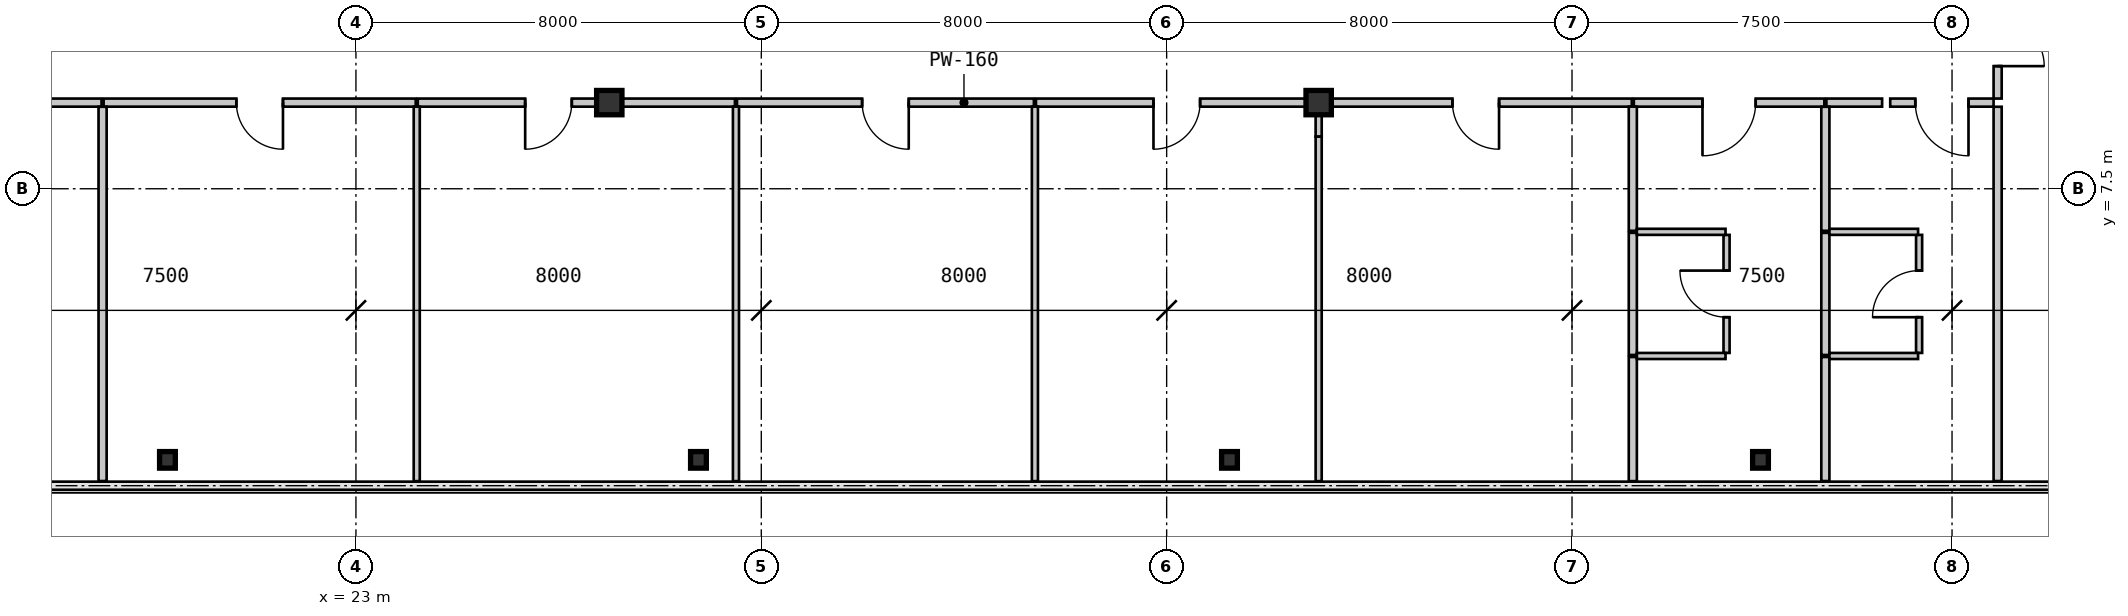
"""IFC4 building model, lengths in metres.
Left out: names, types, materials, properties, quantities, classifications, styles, units other than length and angle.
Written with IfcOpenShell. Run it as: python <this file> out.ifc"""

import sys

from ifc_helpers import new_model, si_unit, direction, frame, frame_2d, origin, origin_2d, place, context, subcontext, project, spatial, rectangle, i_section, extrude, source, transform, mapped, element, fill, save


model = new_model("IFC4")
c1 = context("Model", 3, precision=1e-05, world=origin(), true_north=direction((0.0, 1.0)))
c2 = subcontext(c1, "Body", "Model", "MODEL_VIEW")
j1 = project(units=[si_unit("LENGTHUNIT", "METRE"), si_unit("PLANEANGLEUNIT", "RADIAN")], contexts=[c1])
p1 = place(None, origin())
s1 = spatial("IfcSite", under=j1, at=p1, CompositionType="ELEMENT")
p2 = place(p1, origin())
s2 = spatial("IfcBuilding", under=s1, at=p2, CompositionType="ELEMENT")
p3 = place(p2, frame((0.0, 0.0, 51.45)))
s3 = spatial("IfcBuildingStorey", under=s2, at=p3, CompositionType="ELEMENT", Elevation=51.45)
m1 = source(origin(), c2, "Body", "SweptSolid", [
    extrude(i_section(OverallWidth=0.5, OverallDepth=0.48, WebThickness=0.028, FlangeThickness=0.044, at=origin_2d()), origin(), (0.0, 0.0, 1.0), 3.15),
])
for number, where, z_axis, x_axis in (
    (1, (28.0, 9.2, 0.0), (0.0, 0.0, 1.0), (1.0, 0.0, 0.0)),
    (2, (42.0, 9.2, 0.0), (0.0, 0.0, 1.0), (1.0, 0.0, 0.0)),
):
    element("IfcColumn", number, at=place(p3, frame(where, z_axis=z_axis, x_axis=x_axis)), inside=s3, PredefinedType="COLUMN", context=c2, shape_type="MappedRepresentation", body=[
        mapped(m1, transform((0.0, 0.0, 0.0), scale=1.0)),
    ])
m2 = source(origin(), c2, "Body", "SweptSolid", [
    extrude(i_section(OverallWidth=0.311, OverallDepth=0.327, WebThickness=0.016, FlangeThickness=0.025, at=origin_2d()), origin(), (0.0, 0.0, 1.0), 3.15),
])
for number, where, z_axis, x_axis in (
    (3, (19.28, 2.15, 0.0), (0.0, 0.0, 1.0), (1.0, 0.0, 0.0)),
    (4, (29.76, 2.15, 0.0), (0.0, 0.0, 1.0), (1.0, 0.0, 0.0)),
    (5, (40.24, 2.15, 0.0), (0.0, 0.0, 1.0), (1.0, 0.0, 0.0)),
    (6, (50.72, 2.15, 0.0), (0.0, 0.0, 1.0), (1.0, 0.0, 0.0)),
):
    element("IfcColumn", number, at=place(p3, frame(where, z_axis=z_axis, x_axis=x_axis)), inside=s3, PredefinedType="COLUMN", context=c2, shape_type="MappedRepresentation", body=[
        mapped(m2, transform((0.0, 0.0, 0.0), scale=1.0)),
    ])
m3 = source(origin(), c2, "Body", "SweptSolid", [
    extrude(rectangle(XDim=2.04, YDim=0.16, at=frame_2d((1.02, 0.0))), origin(), (0.0, 0.0, 1.0), 2.93),
])
p4 = place(p3, frame((55.32, 9.2, 0.0), z_axis=(0.0, 0.0, 1.0), x_axis=(-1.0, 0.0, 0.0)))
e7 = element("IfcWall", 7, at=p4, inside=s3, PredefinedType="PARTITIONING", context=c2, shape_type="MappedRepresentation", body=[
    mapped(m3, transform((0.0, 0.0, 0.0), scale=1.0)),
])
m4 = source(origin(), c2, "Body", "SweptSolid", [
    extrude(rectangle(XDim=1.05, YDim=2.1, at=frame_2d((0.525, 1.05))), frame((0.0, 0.09, 0.0), z_axis=(0.0, -1.0, 0.0), x_axis=(1.0, 0.0, 0.0)), (0.0, 0.0, 1.0), 0.18),
])
p5 = place(p4, frame((0.495, 0.0, 0.0)))
e8 = element("IfcOpeningElement", 8, at=p5, cuts=e7, PredefinedType="OPENING", context=c2, shape_type="MappedRepresentation", body=[
    mapped(m4, transform((0.0, 0.0, 0.0), scale=1.0)),
])
m5 = source(origin(), c2, "Body", "SweptSolid", [
    extrude(rectangle(XDim=2.2, YDim=0.16, at=frame_2d((1.1, 0.0))), origin(), (0.0, 0.0, 1.0), 2.93),
])
p6 = place(p3, frame((55.4, 11.48, 0.0), z_axis=(0.0, 0.0, 1.0), x_axis=(0.0, -1.0, 0.0)))
e9 = element("IfcWall", 9, at=p6, inside=s3, PredefinedType="PARTITIONING", context=c2, shape_type="MappedRepresentation", body=[
    mapped(m5, transform((0.0, 0.0, 0.0), scale=1.0)),
])
m6 = source(origin(), c2, "Body", "SweptSolid", [
    extrude(rectangle(XDim=0.92, YDim=2.1, at=frame_2d((0.46, 1.05))), frame((0.0, 0.09, 0.0), z_axis=(0.0, -1.0, 0.0), x_axis=(1.0, 0.0, 0.0)), (0.0, 0.0, 1.0), 0.18),
])
p7 = place(p6, frame((0.64, 0.0, 0.0)))
e10 = element("IfcOpeningElement", 10, at=p7, cuts=e9, PredefinedType="OPENING", context=c2, shape_type="MappedRepresentation", body=[
    mapped(m6, transform((0.0, 0.0, 0.0), scale=1.0)),
])
m7 = source(origin(), c2, "Body", "SweptSolid", [
    extrude(rectangle(XDim=1.1, YDim=0.16, at=frame_2d((0.55, 0.0))), origin(), (0.0, 0.0, 1.0), 2.93),
])
p8 = place(p3, frame((17.98, 9.2, 0.0), z_axis=(0.0, 0.0, 1.0), x_axis=(-1.0, 0.0, 0.0)))
e11 = element("IfcWall", 11, at=p8, inside=s3, PredefinedType="PARTITIONING", context=c2, shape_type="MappedRepresentation", body=[
    mapped(m7, transform((0.0, 0.0, 0.0), scale=1.0)),
])
m8 = source(origin(), c2, "Body", "SweptSolid", [
    extrude(rectangle(XDim=6.159, YDim=0.16, at=frame_2d((3.08, 0.0))), origin(), (0.0, 0.0, 1.0), 2.93),
])
p9 = place(p3, frame((24.18, 9.2, 0.0), z_axis=(0.0, 0.0, 1.0), x_axis=(-1.0, 0.0, 0.0)))
e12 = element("IfcWall", 12, at=p9, inside=s3, PredefinedType="PARTITIONING", context=c2, shape_type="MappedRepresentation", body=[
    mapped(m8, transform((0.0, 0.0, 0.0), scale=1.0)),
])
p10 = place(p9, frame((2.62, 0.0, 0.0)))
e13 = element("IfcOpeningElement", 13, at=p10, cuts=e12, PredefinedType="OPENING", context=c2, shape_type="MappedRepresentation", body=[
    mapped(m6, transform((0.0, 0.0, 0.0), scale=1.0)),
])
m9 = source(origin(), c2, "Body", "SweptSolid", [
    extrude(rectangle(XDim=2.48, YDim=0.16, at=frame_2d((1.24, 0.0))), origin(), (0.0, 0.0, 1.0), 2.328),
])
p11 = place(p3, frame((30.48, 9.2, 0.0), z_axis=(0.0, 0.0, 1.0), x_axis=(-1.0, 0.0, 0.0)))
e14 = element("IfcWall", 14, at=p11, inside=s3, PredefinedType="PARTITIONING", context=c2, shape_type="MappedRepresentation", body=[
    mapped(m9, transform((0.0, 0.0, 0.0), scale=1.0)),
])
m10 = source(origin(), c2, "Body", "SweptSolid", [
    extrude(rectangle(XDim=3.78, YDim=0.16, at=frame_2d((1.89, 0.0))), origin(), (0.0, 0.0, 1.0), 2.93),
])
p12 = place(p3, frame((28.0, 9.2, 0.0), z_axis=(0.0, 0.0, 1.0), x_axis=(-1.0, 0.0, 0.0)))
e15 = element("IfcWall", 15, at=p12, inside=s3, PredefinedType="PARTITIONING", context=c2, shape_type="MappedRepresentation", body=[
    mapped(m10, transform((0.0, 0.0, 0.0), scale=1.0)),
])
p13 = place(p12, frame((0.74, 0.0, 0.0)))
e16 = element("IfcOpeningElement", 16, at=p13, cuts=e15, PredefinedType="OPENING", context=c2, shape_type="MappedRepresentation", body=[
    mapped(m6, transform((0.0, 0.0, 0.0), scale=1.0)),
])
m11 = source(origin(), c2, "Body", "SweptSolid", [
    extrude(rectangle(XDim=5.86, YDim=0.16, at=frame_2d((2.93, 0.0))), origin(), (0.0, 0.0, 1.0), 2.328),
])
p14 = place(p3, frame((36.38, 9.2, 0.0), z_axis=(0.0, 0.0, 1.0), x_axis=(-1.0, 0.0, 0.0)))
e17 = element("IfcWall", 17, at=p14, inside=s3, PredefinedType="PARTITIONING", context=c2, shape_type="MappedRepresentation", body=[
    mapped(m11, transform((0.0, 0.0, 0.0), scale=1.0)),
])
p15 = place(p14, frame((2.47, 0.0, 0.0)))
e18 = element("IfcOpeningElement", 18, at=p15, cuts=e17, PredefinedType="OPENING", context=c2, shape_type="MappedRepresentation", body=[
    mapped(m6, transform((0.0, 0.0, 0.0), scale=1.0)),
])
m12 = source(origin(), c2, "Body", "SweptSolid", [
    extrude(rectangle(XDim=5.56, YDim=0.16, at=frame_2d((2.78, 0.0))), origin(), (0.0, 0.0, 1.0), 2.328),
])
p16 = place(p3, frame((41.98, 9.2, 0.0), z_axis=(0.0, 0.0, 1.0), x_axis=(-1.0, 0.0, 0.0)))
e19 = element("IfcWall", 19, at=p16, inside=s3, PredefinedType="PARTITIONING", context=c2, shape_type="MappedRepresentation", body=[
    mapped(m12, transform((0.0, 0.0, 0.0), scale=1.0)),
])
p17 = place(p16, frame((2.32, 0.0, 0.0)))
e20 = element("IfcOpeningElement", 20, at=p17, cuts=e19, PredefinedType="OPENING", context=c2, shape_type="MappedRepresentation", body=[
    mapped(m6, transform((0.0, 0.0, 0.0), scale=1.0)),
])
p18 = place(p3, frame((48.18, 9.2, 0.0), z_axis=(0.0, 0.0, 1.0), x_axis=(-1.0, 0.0, 0.0)))
e21 = element("IfcWall", 21, at=p18, inside=s3, PredefinedType="PARTITIONING", context=c2, shape_type="MappedRepresentation", body=[
    mapped(m8, transform((0.0, 0.0, 0.0), scale=1.0)),
])
p19 = place(p18, frame((2.62, 0.0, 0.0)))
e22 = element("IfcOpeningElement", 22, at=p19, cuts=e21, PredefinedType="OPENING", context=c2, shape_type="MappedRepresentation", body=[
    mapped(m6, transform((0.0, 0.0, 0.0), scale=1.0)),
])
m13 = source(origin(), c2, "Body", "SweptSolid", [
    extrude(rectangle(XDim=3.76, YDim=0.16, at=frame_2d((1.88, 0.0))), origin(), (0.0, 0.0, 1.0), 2.93),
])
p20 = place(p3, frame((51.98, 9.2, 0.0), z_axis=(0.0, 0.0, 1.0), x_axis=(-1.0, 0.0, 0.0)))
e23 = element("IfcWall", 23, at=p20, inside=s3, PredefinedType="PARTITIONING", context=c2, shape_type="MappedRepresentation", body=[
    mapped(m13, transform((0.0, 0.0, 0.0), scale=1.0)),
])
p21 = place(p20, frame((1.355, 0.0, 0.0)))
e24 = element("IfcOpeningElement", 24, at=p21, cuts=e23, PredefinedType="OPENING", context=c2, shape_type="MappedRepresentation", body=[
    mapped(m4, transform((0.0, 0.0, 0.0), scale=1.0)),
])
p22 = place(p3, frame((53.12, 9.2, 0.0), z_axis=(0.0, 0.0, 1.0), x_axis=(-1.0, 0.0, 0.0)))
e25 = element("IfcWall", 25, at=p22, inside=s3, PredefinedType="PARTITIONING", context=c2, shape_type="MappedRepresentation", body=[
    mapped(m7, transform((0.0, 0.0, 0.0), scale=1.0)),
])
m14 = source(origin(), c2, "Body", "SweptSolid", [
    extrude(rectangle(XDim=7.386, YDim=0.16, at=frame_2d((3.693, 0.0))), origin(), (0.0, 0.0, 1.0), 2.93),
])
p23 = place(p3, frame((18.0, 9.118, 0.0), z_axis=(0.0, 0.0, 1.0), x_axis=(0.0, -1.0, 0.0)))
e26 = element("IfcWall", 26, at=p23, inside=s3, PredefinedType="PARTITIONING", context=c2, shape_type="MappedRepresentation", body=[
    mapped(m14, transform((0.0, 0.0, 0.0), scale=1.0)),
])
m15 = source(origin(), c2, "Body", "SweptSolid", [
    extrude(rectangle(XDim=7.39, YDim=0.12, at=frame_2d((3.695, 0.0))), origin(), (0.0, 0.0, 1.0), 2.93),
])
for number, where, z_axis, x_axis in (
    (27, (24.2, 9.12, 0.0), (0.0, 0.0, 1.0), (0.0, -1.0, 0.0)),
    (28, (30.5, 9.12, 0.0), (0.0, 0.0, 1.0), (0.0, -1.0, 0.0)),
    (29, (36.4, 9.12, 0.0), (0.0, 0.0, 1.0), (0.0, -1.0, 0.0)),
):
    element("IfcWall", number, at=place(p3, frame(where, z_axis=z_axis, x_axis=x_axis)), inside=s3, PredefinedType="PARTITIONING", context=c2, shape_type="MappedRepresentation", body=[
        mapped(m15, transform((0.0, 0.0, 0.0), scale=1.0)),
    ])
m16 = source(origin(), c2, "Body", "SweptSolid", [
    extrude(rectangle(XDim=0.592, YDim=0.12, at=frame_2d((0.296, 0.0))), origin(), (0.0, 0.0, 1.0), 2.397),
])
p24 = place(p3, frame((42.0, 9.12, 0.0), z_axis=(0.0, 0.0, 1.0), x_axis=(0.0, -1.0, 0.0)))
e30 = element("IfcWall", 30, at=p24, inside=s3, PredefinedType="PARTITIONING", context=c2, shape_type="MappedRepresentation", body=[
    mapped(m16, transform((0.0, 0.0, 0.0), scale=1.0)),
])
m17 = source(origin(), c2, "Body", "SweptSolid", [
    extrude(rectangle(XDim=6.798, YDim=0.12, at=frame_2d((3.399, 0.0))), origin(), (0.0, 0.0, 1.0), 2.93),
])
p25 = place(p3, frame((42.0, 8.528, 0.0), z_axis=(0.0, 0.0, 1.0), x_axis=(0.0, -1.0, 0.0)))
e31 = element("IfcWall", 31, at=p25, inside=s3, PredefinedType="PARTITIONING", context=c2, shape_type="MappedRepresentation", body=[
    mapped(m17, transform((0.0, 0.0, 0.0), scale=1.0)),
])
m18 = source(origin(), c2, "Body", "SweptSolid", [
    extrude(rectangle(XDim=2.45, YDim=0.16, at=frame_2d((1.225, 0.0))), origin(), (0.0, 0.0, 1.0), 2.93),
])
p26 = place(p3, frame((48.2, 4.18, 0.0), z_axis=(0.0, 0.0, 1.0), x_axis=(0.0, -1.0, 0.0)))
e32 = element("IfcWall", 32, at=p26, inside=s3, PredefinedType="PARTITIONING", context=c2, shape_type="MappedRepresentation", body=[
    mapped(m18, transform((0.0, 0.0, 0.0), scale=1.0)),
])
m19 = source(origin(), c2, "Body", "SweptSolid", [
    extrude(rectangle(XDim=2.45, YDim=0.16, at=frame_2d((1.225, 0.0))), origin(), (0.0, 0.0, 1.0), 2.93),
])
p27 = place(p3, frame((48.2, 9.12, 0.0), z_axis=(0.0, 0.0, 1.0), x_axis=(0.0, -1.0, 0.0)))
e33 = element("IfcWall", 33, at=p27, inside=s3, PredefinedType="PARTITIONING", context=c2, shape_type="MappedRepresentation", body=[
    mapped(m19, transform((0.0, 0.0, 0.0), scale=1.0)),
])
m20 = source(origin(), c2, "Body", "SweptSolid", [
    extrude(rectangle(XDim=2.41, YDim=0.16, at=frame_2d((1.205, 0.0))), origin(), (0.0, 0.0, 1.0), 2.93),
])
p28 = place(p3, frame((48.2, 6.63, 0.0), z_axis=(0.0, 0.0, 1.0), x_axis=(0.0, -1.0, 0.0)))
e34 = element("IfcWall", 34, at=p28, inside=s3, PredefinedType="PARTITIONING", context=c2, shape_type="MappedRepresentation", body=[
    mapped(m20, transform((0.0, 0.0, 0.0), scale=1.0)),
])
m21 = source(origin(), c2, "Body", "SweptSolid", [
    extrude(rectangle(XDim=2.33, YDim=0.12, at=frame_2d((1.165, 0.0))), origin(), (0.0, 0.0, 1.0), 2.93),
])
p29 = place(p3, frame((50.05, 4.26, 0.0), z_axis=(0.0, 0.0, 1.0), x_axis=(0.0, 1.0, 0.0)))
e35 = element("IfcWall", 35, at=p29, inside=s3, PredefinedType="PARTITIONING", context=c2, shape_type="MappedRepresentation", body=[
    mapped(m21, transform((0.0, 0.0, 0.0), scale=1.0)),
])
m22 = source(origin(), c2, "Body", "SweptSolid", [
    extrude(rectangle(XDim=0.92, YDim=2.1, at=frame_2d((0.46, 1.05))), frame((0.0, 0.07, 0.0), z_axis=(0.0, -1.0, 0.0), x_axis=(1.0, 0.0, 0.0)), (0.0, 0.0, 1.0), 0.14),
])
p30 = place(p29, frame((0.705, 0.0, 0.0)))
e36 = element("IfcOpeningElement", 36, at=p30, cuts=e35, PredefinedType="OPENING", context=c2, shape_type="MappedRepresentation", body=[
    mapped(m22, transform((0.0, 0.0, 0.0), scale=1.0)),
])
m23 = source(origin(), c2, "Body", "SweptSolid", [
    extrude(rectangle(XDim=1.75, YDim=0.12, at=frame_2d((0.875, 0.0))), origin(), (0.0, 0.0, 1.0), 2.93),
])
for number, where, z_axis, x_axis in (
    (37, (48.28, 4.2, 0.0), (0.0, 0.0, 1.0), (1.0, 0.0, 0.0)),
    (38, (50.03, 6.65, 0.0), (0.0, 0.0, 1.0), (-1.0, 0.0, 0.0)),
):
    element("IfcWall", number, at=place(p3, frame(where, z_axis=z_axis, x_axis=x_axis)), inside=s3, PredefinedType="PARTITIONING", context=c2, shape_type="MappedRepresentation", body=[
        mapped(m23, transform((0.0, 0.0, 0.0), scale=1.0)),
    ])
m24 = source(origin(), c2, "Body", "SweptSolid", [
    extrude(rectangle(XDim=2.448, YDim=0.16, at=frame_2d((1.224, 0.0))), origin(), (0.0, 0.0, 1.0), 2.93),
])
for number, where, z_axis, x_axis in (
    (39, (52.0, 4.18, 0.0), (0.0, 0.0, 1.0), (0.0, -1.0, 0.0)),
    (40, (52.0, 9.118, 0.0), (0.0, 0.0, 1.0), (0.0, -1.0, 0.0)),
):
    element("IfcWall", number, at=place(p3, frame(where, z_axis=z_axis, x_axis=x_axis)), inside=s3, PredefinedType="PARTITIONING", context=c2, shape_type="MappedRepresentation", body=[
        mapped(m24, transform((0.0, 0.0, 0.0), scale=1.0)),
    ])
p31 = place(p3, frame((52.0, 6.63, 0.0), z_axis=(0.0, 0.0, 1.0), x_axis=(0.0, -1.0, 0.0)))
e41 = element("IfcWall", 41, at=p31, inside=s3, PredefinedType="PARTITIONING", context=c2, shape_type="MappedRepresentation", body=[
    mapped(m20, transform((0.0, 0.0, 0.0), scale=1.0)),
])
p32 = place(p3, frame((53.85, 4.26, 0.0), z_axis=(0.0, 0.0, 1.0), x_axis=(0.0, 1.0, 0.0)))
e42 = element("IfcWall", 42, at=p32, inside=s3, PredefinedType="PARTITIONING", context=c2, shape_type="MappedRepresentation", body=[
    mapped(m21, transform((0.0, 0.0, 0.0), scale=1.0)),
])
p33 = place(p32, frame((0.705, 0.0, 0.0)))
e43 = element("IfcOpeningElement", 43, at=p33, cuts=e42, PredefinedType="OPENING", context=c2, shape_type="MappedRepresentation", body=[
    mapped(m22, transform((0.0, 0.0, 0.0), scale=1.0)),
])
for number, where, z_axis, x_axis in (
    (44, (52.08, 4.2, 0.0), (0.0, 0.0, 1.0), (1.0, 0.0, 0.0)),
    (45, (53.83, 6.65, 0.0), (0.0, 0.0, 1.0), (-1.0, 0.0, 0.0)),
):
    element("IfcWall", number, at=place(p3, frame(where, z_axis=z_axis, x_axis=x_axis)), inside=s3, PredefinedType="PARTITIONING", context=c2, shape_type="MappedRepresentation", body=[
        mapped(m23, transform((0.0, 0.0, 0.0), scale=1.0)),
    ])
p34 = place(p3, frame((55.4, 9.118, 0.0), z_axis=(0.0, 0.0, 1.0), x_axis=(0.0, -1.0, 0.0)))
e46 = element("IfcWall", 46, at=p34, inside=s3, PredefinedType="PARTITIONING", context=c2, shape_type="MappedRepresentation", body=[
    mapped(m14, transform((0.0, 0.0, 0.0), scale=1.0)),
])
m25 = source(origin(), c2, "Body", "SweptSolid", [
    extrude(rectangle(XDim=1.05, YDim=2.1, at=frame_2d((0.525, 1.05))), frame((0.0, 0.025, 0.0), z_axis=(0.0, -1.0, 0.0), x_axis=(1.0, 0.0, 0.0)), (0.0, 0.0, 1.0), 0.05),
])
p35 = place(p5, origin())
e47 = element("IfcDoor", 47, at=p35, inside=s3, OperationType="SINGLE_SWING_LEFT", PredefinedType="DOOR", context=c2, shape_type="MappedRepresentation", body=[
    mapped(m25, transform((0.0, 0.0, 0.0), scale=1.0)),
])
fill(e8, e47)
m26 = source(origin(), c2, "Body", "SweptSolid", [
    extrude(rectangle(XDim=0.92, YDim=2.1, at=frame_2d((0.46, 1.05))), frame((0.0, 0.025, 0.0), z_axis=(0.0, -1.0, 0.0), x_axis=(1.0, 0.0, 0.0)), (0.0, 0.0, 1.0), 0.05),
])
p36 = place(p7, origin())
e48 = element("IfcDoor", 48, at=p36, inside=s3, OperationType="SINGLE_SWING_RIGHT", PredefinedType="DOOR", context=c2, shape_type="MappedRepresentation", body=[
    mapped(m26, transform((0.0, 0.0, 0.0), scale=1.0)),
])
fill(e10, e48)
p37 = place(p10, origin())
e49 = element("IfcDoor", 49, at=p37, inside=s3, OperationType="SINGLE_SWING_LEFT", PredefinedType="DOOR", context=c2, shape_type="MappedRepresentation", body=[
    mapped(m26, transform((0.0, 0.0, 0.0), scale=1.0)),
])
fill(e13, e49)
p38 = place(p13, origin())
e50 = element("IfcDoor", 50, at=p38, inside=s3, OperationType="SINGLE_SWING_RIGHT", PredefinedType="DOOR", context=c2, shape_type="MappedRepresentation", body=[
    mapped(m26, transform((0.0, 0.0, 0.0), scale=1.0)),
])
fill(e16, e50)
p39 = place(p15, origin())
e51 = element("IfcDoor", 51, at=p39, inside=s3, OperationType="SINGLE_SWING_LEFT", PredefinedType="DOOR", context=c2, shape_type="MappedRepresentation", body=[
    mapped(m26, transform((0.0, 0.0, 0.0), scale=1.0)),
])
fill(e18, e51)
p40 = place(p17, origin())
e52 = element("IfcDoor", 52, at=p40, inside=s3, OperationType="SINGLE_SWING_RIGHT", PredefinedType="DOOR", context=c2, shape_type="MappedRepresentation", body=[
    mapped(m26, transform((0.0, 0.0, 0.0), scale=1.0)),
])
fill(e20, e52)
p41 = place(p19, origin())
e53 = element("IfcDoor", 53, at=p41, inside=s3, OperationType="SINGLE_SWING_LEFT", PredefinedType="DOOR", context=c2, shape_type="MappedRepresentation", body=[
    mapped(m26, transform((0.0, 0.0, 0.0), scale=1.0)),
])
fill(e22, e53)
p42 = place(p21, origin())
e54 = element("IfcDoor", 54, at=p42, inside=s3, OperationType="SINGLE_SWING_RIGHT", PredefinedType="DOOR", context=c2, shape_type="MappedRepresentation", body=[
    mapped(m25, transform((0.0, 0.0, 0.0), scale=1.0)),
])
fill(e24, e54)
p43 = place(p30, origin())
e55 = element("IfcDoor", 55, at=p43, inside=s3, OperationType="SINGLE_SWING_RIGHT", PredefinedType="DOOR", context=c2, shape_type="MappedRepresentation", body=[
    mapped(m26, transform((0.0, 0.0, 0.0), scale=1.0)),
])
fill(e36, e55)
p44 = place(p33, origin())
e56 = element("IfcDoor", 56, at=p44, inside=s3, OperationType="SINGLE_SWING_LEFT", PredefinedType="DOOR", context=c2, shape_type="MappedRepresentation", body=[
    mapped(m26, transform((0.0, 0.0, 0.0), scale=1.0)),
])
fill(e43, e56)
save(model, sys.argv[1])
